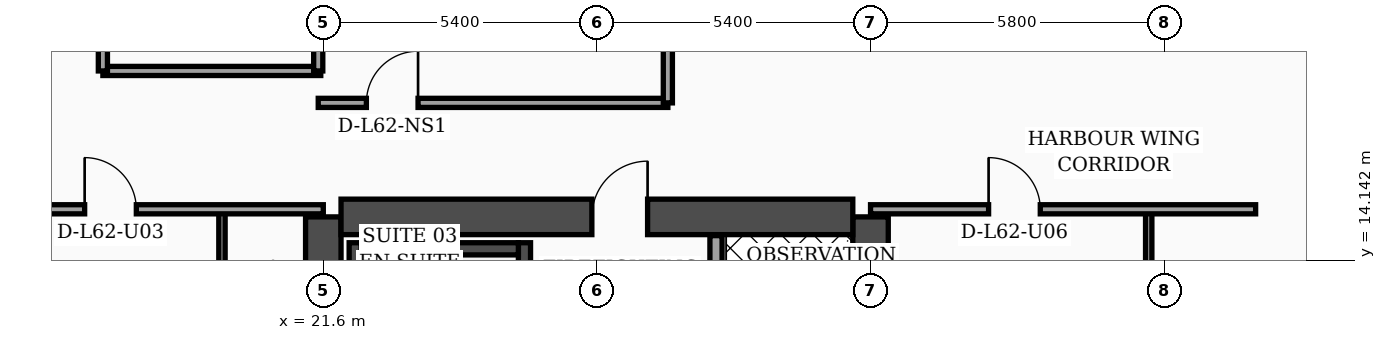
"""IFC4 building model, lengths in metres.
Left out: names, types, materials, properties, quantities, classifications, styles, units other than length and angle.
Written with IfcOpenShell. Run it as: python <this file> out.ifc"""

import sys

from ifc_helpers import new_model, si_unit, direction, frame, frame_2d, origin, place, context, subcontext, project, spatial, rectangle, extrude, element, fill, save


model = new_model("IFC4")
c1 = context("Model", 3, precision=1e-05, world=origin(), true_north=direction((0.0, 1.0)))
c2 = subcontext(c1, "Body", "Model", "MODEL_VIEW")
j1 = project(units=[si_unit("LENGTHUNIT", "METRE"), si_unit("PLANEANGLEUNIT", "RADIAN")], contexts=[c1])
p1 = place(None, origin())
s1 = spatial("IfcSite", under=j1, at=p1, CompositionType="ELEMENT")
p2 = place(p1, origin())
s2 = spatial("IfcBuilding", under=s1, at=p2, CompositionType="ELEMENT")
p3 = place(p2, frame((0.0, 0.0, 251.4)))
s3 = spatial("IfcBuildingStorey", under=s2, at=p3, CompositionType="ELEMENT", Elevation=251.4)
for number, where, z_axis, x_axis in (
    (1, (21.6, 4.6, 0.0), (0.0, 0.0, 1.0), (0.0, 1.0, 0.0)),
    (2, (32.4, 4.6, 0.0), (0.0, 0.0, 1.0), (0.0, 1.0, 0.0)),
):
    element("IfcWall", number, at=place(p3, frame(where, z_axis=z_axis, x_axis=x_axis)), inside=s3, PredefinedType="SHEAR", context=c2, shape_type="SweptSolid", body=[
        extrude(rectangle(XDim=10.4, YDim=0.7, at=frame_2d((5.2, 0.0))), origin(), (0.0, 0.0, 1.0), 3.56),
    ])
p4 = place(p3, frame((21.95, 15.0, 0.0), z_axis=(0.0, 0.0, 1.0), x_axis=(1.0, 0.0, 0.0)))
e3 = element("IfcWall", 3, at=p4, inside=s3, PredefinedType="SHEAR", context=c2, shape_type="SweptSolid", body=[
    extrude(rectangle(XDim=10.1, YDim=0.7, at=frame_2d((5.05, 0.0))), origin(), (0.0, 0.0, 1.0), 3.56),
])
p5 = place(p4, frame((4.95, 0.0, 0.0)))
e4 = element("IfcOpeningElement", 4, at=p5, cuts=e3, PredefinedType="OPENING", context=c2, shape_type="SweptSolid", body=[
    extrude(rectangle(XDim=1.1, YDim=2.2, at=frame_2d((0.55, 1.1))), frame((0.0, 0.36, 0.0), z_axis=(0.0, -1.0, 0.0), x_axis=(1.0, 0.0, 0.0)), (0.0, 0.0, 1.0), 0.72),
])
p6 = place(p3, frame((22.23, 4.95, 0.0), z_axis=(0.0, 0.0, 1.0), x_axis=(0.0, 1.0, 0.0)))
e5 = element("IfcWall", 5, at=p6, inside=s3, PredefinedType="SOLIDWALL", context=c2, shape_type="SweptSolid", body=[
    extrude(rectangle(XDim=9.54, YDim=0.24, at=frame_2d((4.77, 0.0))), origin(), (0.0, 0.0, 1.0), 3.56),
])
p7 = place(p3, frame((25.57, 4.95, 0.0), z_axis=(0.0, 0.0, 1.0), x_axis=(0.0, 1.0, 0.0)))
e6 = element("IfcWall", 6, at=p7, inside=s3, PredefinedType="SOLIDWALL", context=c2, shape_type="SweptSolid", body=[
    extrude(rectangle(XDim=9.54, YDim=0.24, at=frame_2d((4.77, 0.0))), origin(), (0.0, 0.0, 1.0), 3.56),
])
p8 = place(p7, frame((0.35, 0.0, 0.0)))
e7 = element("IfcOpeningElement", 7, at=p8, cuts=e6, PredefinedType="OPENING", context=c2, shape_type="SweptSolid", body=[
    extrude(rectangle(XDim=1.15, YDim=2.2, at=frame_2d((0.575, 1.1))), frame((0.0, 0.13, 0.0), z_axis=(0.0, -1.0, 0.0), x_axis=(1.0, 0.0, 0.0)), (0.0, 0.0, 1.0), 0.26),
])
p9 = place(p3, frame((22.35, 14.37, 0.0), z_axis=(0.0, 0.0, 1.0), x_axis=(1.0, 0.0, 0.0)))
e8 = element("IfcWall", 8, at=p9, inside=s3, PredefinedType="SOLIDWALL", context=c2, shape_type="SweptSolid", body=[
    extrude(rectangle(XDim=3.1, YDim=0.24, at=frame_2d((1.55, 0.0))), origin(), (0.0, 0.0, 1.0), 3.56),
])
p10 = place(p3, frame((46.63, 5.505, 0.0), z_axis=(0.0, 0.0, 1.0), x_axis=(-0.300501856448, 0.953781229775, 0.0)))
e9 = element("IfcWall", 9, at=p10, inside=s3, PredefinedType="SOLIDWALL", context=c2, shape_type="SweptSolid", body=[
    extrude(rectangle(XDim=30.814, YDim=0.32, at=frame_2d((15.407, 0.0))), origin(), (0.0, 0.0, 1.0), 3.56),
])
p11 = place(p10, frame((10.199, 0.0, 0.0)))
e10 = element("IfcOpeningElement", 10, at=p11, cuts=e9, PredefinedType="OPENING", context=c2, shape_type="SweptSolid", body=[
    extrude(rectangle(XDim=1.4, YDim=2.25, at=frame_2d((0.7, 1.125))), frame((0.0, 0.17, 0.0), z_axis=(0.0, -1.0, 0.0), x_axis=(1.0, 0.0, 0.0)), (0.0, 0.0, 1.0), 0.34),
])
p12 = place(p10, frame((4.437, 0.0, 0.7)))
e11 = element("IfcOpeningElement", 11, at=p12, cuts=e9, PredefinedType="OPENING", context=c2, shape_type="SweptSolid", body=[
    extrude(rectangle(XDim=1.6, YDim=1.65, at=frame_2d((0.8, 0.825))), frame((0.0, 0.17, 0.0), z_axis=(0.0, -1.0, 0.0), x_axis=(1.0, 0.0, 0.0)), (0.0, 0.0, 1.0), 0.34),
])
p13 = place(p10, frame((18.696, 0.0, 0.7)))
e12 = element("IfcOpeningElement", 12, at=p13, cuts=e9, PredefinedType="OPENING", context=c2, shape_type="SweptSolid", body=[
    extrude(rectangle(XDim=1.6, YDim=1.65, at=frame_2d((0.8, 0.825))), frame((0.0, 0.17, 0.0), z_axis=(0.0, -1.0, 0.0), x_axis=(1.0, 0.0, 0.0)), (0.0, 0.0, 1.0), 0.34),
])
p14 = place(p10, frame((1.6, 0.0, 0.75)))
e13 = element("IfcOpeningElement", 13, at=p14, cuts=e9, PredefinedType="OPENING", context=c2, shape_type="SweptSolid", body=[
    extrude(rectangle(XDim=1.5, YDim=1.6, at=frame_2d((0.75, 0.8))), frame((0.0, 0.17, 0.0), z_axis=(0.0, -1.0, 0.0), x_axis=(1.0, 0.0, 0.0)), (0.0, 0.0, 1.0), 0.34),
])
p15 = place(p10, frame((7.8, 0.0, 0.75)))
e14 = element("IfcOpeningElement", 14, at=p15, cuts=e9, PredefinedType="OPENING", context=c2, shape_type="SweptSolid", body=[
    extrude(rectangle(XDim=1.5, YDim=1.6, at=frame_2d((0.75, 0.8))), frame((0.0, 0.17, 0.0), z_axis=(0.0, -1.0, 0.0), x_axis=(1.0, 0.0, 0.0)), (0.0, 0.0, 1.0), 0.34),
])
p16 = place(p10, frame((14.0, 0.0, 0.75)))
e15 = element("IfcOpeningElement", 15, at=p16, cuts=e9, PredefinedType="OPENING", context=c2, shape_type="SweptSolid", body=[
    extrude(rectangle(XDim=1.5, YDim=1.6, at=frame_2d((0.75, 0.8))), frame((0.0, 0.17, 0.0), z_axis=(0.0, -1.0, 0.0), x_axis=(1.0, 0.0, 0.0)), (0.0, 0.0, 1.0), 0.34),
])
p17 = place(p10, frame((16.55, 0.0, 0.75)))
e16 = element("IfcOpeningElement", 16, at=p17, cuts=e9, PredefinedType="OPENING", context=c2, shape_type="SweptSolid", body=[
    extrude(rectangle(XDim=1.5, YDim=1.6, at=frame_2d((0.75, 0.8))), frame((0.0, 0.17, 0.0), z_axis=(0.0, -1.0, 0.0), x_axis=(1.0, 0.0, 0.0)), (0.0, 0.0, 1.0), 0.34),
])
p18 = place(p10, frame((20.75, 0.0, 0.75)))
e17 = element("IfcOpeningElement", 17, at=p18, cuts=e9, PredefinedType="OPENING", context=c2, shape_type="SweptSolid", body=[
    extrude(rectangle(XDim=1.5, YDim=1.6, at=frame_2d((0.75, 0.8))), frame((0.0, 0.17, 0.0), z_axis=(0.0, -1.0, 0.0), x_axis=(1.0, 0.0, 0.0)), (0.0, 0.0, 1.0), 0.34),
])
p19 = place(p10, frame((23.3, 0.0, 0.75)))
e18 = element("IfcOpeningElement", 18, at=p19, cuts=e9, PredefinedType="OPENING", context=c2, shape_type="SweptSolid", body=[
    extrude(rectangle(XDim=1.5, YDim=1.6, at=frame_2d((0.75, 0.8))), frame((0.0, 0.17, 0.0), z_axis=(0.0, -1.0, 0.0), x_axis=(1.0, 0.0, 0.0)), (0.0, 0.0, 1.0), 0.34),
])
p20 = place(p10, frame((26.4, 0.0, 0.75)))
e19 = element("IfcOpeningElement", 19, at=p20, cuts=e9, PredefinedType="OPENING", context=c2, shape_type="SweptSolid", body=[
    extrude(rectangle(XDim=1.5, YDim=1.6, at=frame_2d((0.75, 0.8))), frame((0.0, 0.17, 0.0), z_axis=(0.0, -1.0, 0.0), x_axis=(1.0, 0.0, 0.0)), (0.0, 0.0, 1.0), 0.34),
])
p21 = place(p3, frame((29.35, 4.97, 0.0), z_axis=(0.0, 0.0, 1.0), x_axis=(0.0, 1.0, 0.0)))
e20 = element("IfcWall", 20, at=p21, inside=s3, PredefinedType="SOLIDWALL", context=c2, shape_type="SweptSolid", body=[
    extrude(rectangle(XDim=9.66, YDim=0.24, at=frame_2d((4.83, 0.0))), origin(), (0.0, 0.0, 1.0), 3.56),
])
p22 = place(p21, frame((0.55, 0.0, 0.0)))
e21 = element("IfcOpeningElement", 21, at=p22, cuts=e20, PredefinedType="OPENING", context=c2, shape_type="SweptSolid", body=[
    extrude(rectangle(XDim=1.3, YDim=2.35, at=frame_2d((0.65, 1.175))), frame((0.0, 0.13, 0.0), z_axis=(0.0, -1.0, 0.0), x_axis=(1.0, 0.0, 0.0)), (0.0, 0.0, 1.0), 0.26),
])
p23 = place(p3, frame((19.6, 2.44, 0.0), z_axis=(0.0, 0.0, 1.0), x_axis=(0.0, 1.0, 0.0)))
e22 = element("IfcWall", 22, at=p23, inside=s3, PredefinedType="PARTITIONING", context=c2, shape_type="SweptSolid", body=[
    extrude(rectangle(XDim=12.71, YDim=0.125, at=frame_2d((6.355, 0.0))), origin(), (0.0, 0.0, 1.0), 2.59),
])
p24 = place(p23, frame((4.34, 0.0, 0.0)))
e23 = element("IfcOpeningElement", 23, at=p24, cuts=e22, PredefinedType="OPENING", context=c2, shape_type="SweptSolid", body=[
    extrude(rectangle(XDim=0.96, YDim=2.2, at=frame_2d((0.48, 1.1))), frame((0.0, 0.073, 0.0), z_axis=(0.0, -1.0, 0.0), x_axis=(1.0, 0.0, 0.0)), (0.0, 0.0, 1.0), 0.145),
])
p25 = place(p23, frame((10.18, 0.0, 0.0)))
e24 = element("IfcOpeningElement", 24, at=p25, cuts=e22, PredefinedType="OPENING", context=c2, shape_type="SweptSolid", body=[
    extrude(rectangle(XDim=0.9, YDim=2.15, at=frame_2d((0.45, 1.075))), frame((0.0, 0.073, 0.0), z_axis=(0.0, -1.0, 0.0), x_axis=(1.0, 0.0, 0.0)), (0.0, 0.0, 1.0), 0.145),
])
p26 = place(p3, frame((15.15, 15.15, 0.0), z_axis=(0.0, 0.0, 1.0), x_axis=(1.0, 0.0, 0.0)))
e25 = element("IfcWall", 25, at=p26, inside=s3, PredefinedType="PARTITIONING", context=c2, shape_type="SweptSolid", body=[
    extrude(rectangle(XDim=6.45, YDim=0.18, at=frame_2d((3.225, 0.0))), origin(), (0.0, 0.0, 1.0), 2.59),
])
p27 = place(p26, frame((1.74, 0.0, 0.0)))
e26 = element("IfcOpeningElement", 26, at=p27, cuts=e25, PredefinedType="OPENING", context=c2, shape_type="SweptSolid", body=[
    extrude(rectangle(XDim=1.02, YDim=2.2, at=frame_2d((0.51, 1.1))), frame((0.0, 0.1, 0.0), z_axis=(0.0, -1.0, 0.0), x_axis=(1.0, 0.0, 0.0)), (0.0, 0.0, 1.0), 0.2),
])
p28 = place(p3, frame((17.25, 17.88, 0.0), z_axis=(0.0, 0.0, 1.0), x_axis=(1.0, 0.0, 0.0)))
e27 = element("IfcWall", 27, at=p28, inside=s3, PredefinedType="PARTITIONING", context=c2, shape_type="SweptSolid", body=[
    extrude(rectangle(XDim=4.3, YDim=0.18, at=frame_2d((2.15, 0.0))), origin(), (0.0, 0.0, 1.0), 3.56),
])
p29 = place(p3, frame((21.5, 17.88, 0.0), z_axis=(0.0, 0.0, 1.0), x_axis=(0.0, 1.0, 0.0)))
e28 = element("IfcWall", 28, at=p29, inside=s3, PredefinedType="PARTITIONING", context=c2, shape_type="SweptSolid", body=[
    extrude(rectangle(XDim=6.44, YDim=0.18, at=frame_2d((3.22, 0.0))), origin(), (0.0, 0.0, 1.0), 3.09),
])
p30 = place(p3, frame((17.25, 17.88, 0.0), z_axis=(0.0, 0.0, 1.0), x_axis=(0.0, 1.0, 0.0)))
e29 = element("IfcWall", 29, at=p30, inside=s3, PredefinedType="PARTITIONING", context=c2, shape_type="SweptSolid", body=[
    extrude(rectangle(XDim=6.44, YDim=0.18, at=frame_2d((3.22, 0.0))), origin(), (0.0, 0.0, 1.0), 3.09),
])
p31 = place(p30, frame((0.65, 0.0, 0.0)))
e30 = element("IfcOpeningElement", 30, at=p31, cuts=e29, PredefinedType="OPENING", context=c2, shape_type="SweptSolid", body=[
    extrude(rectangle(XDim=0.98, YDim=2.15, at=frame_2d((0.49, 1.075))), frame((0.0, 0.1, 0.0), z_axis=(0.0, -1.0, 0.0), x_axis=(1.0, 0.0, 0.0)), (0.0, 0.0, 1.0), 0.2),
])
p32 = place(p30, frame((3.27, 0.0, 0.0)))
e31 = element("IfcOpeningElement", 31, at=p32, cuts=e29, PredefinedType="OPENING", context=c2, shape_type="SweptSolid", body=[
    extrude(rectangle(XDim=0.96, YDim=2.2, at=frame_2d((0.48, 1.1))), frame((0.0, 0.1, 0.0), z_axis=(0.0, -1.0, 0.0), x_axis=(1.0, 0.0, 0.0)), (0.0, 0.0, 1.0), 0.2),
])
p33 = place(p3, frame((37.89, 2.44, 0.0), z_axis=(0.0, 0.0, 1.0), x_axis=(0.0, 1.0, 0.0)))
e32 = element("IfcWall", 32, at=p33, inside=s3, PredefinedType="PARTITIONING", context=c2, shape_type="SweptSolid", body=[
    extrude(rectangle(XDim=12.71, YDim=0.125, at=frame_2d((6.355, 0.0))), origin(), (0.0, 0.0, 1.0), 2.99),
])
p34 = place(p33, frame((4.35, 0.0, 0.0)))
e33 = element("IfcOpeningElement", 33, at=p34, cuts=e32, PredefinedType="OPENING", context=c2, shape_type="SweptSolid", body=[
    extrude(rectangle(XDim=0.96, YDim=2.2, at=frame_2d((0.48, 1.1))), frame((0.0, 0.073, 0.0), z_axis=(0.0, -1.0, 0.0), x_axis=(1.0, 0.0, 0.0)), (0.0, 0.0, 1.0), 0.145),
])
p35 = place(p33, frame((10.21, 0.0, 0.0)))
e34 = element("IfcOpeningElement", 34, at=p35, cuts=e32, PredefinedType="OPENING", context=c2, shape_type="SweptSolid", body=[
    extrude(rectangle(XDim=0.9, YDim=2.15, at=frame_2d((0.45, 1.075))), frame((0.0, 0.073, 0.0), z_axis=(0.0, -1.0, 0.0), x_axis=(1.0, 0.0, 0.0)), (0.0, 0.0, 1.0), 0.145),
])
p36 = place(p3, frame((32.4, 15.15, 0.0), z_axis=(0.0, 0.0, 1.0), x_axis=(1.0, 0.0, 0.0)))
e35 = element("IfcWall", 35, at=p36, inside=s3, PredefinedType="PARTITIONING", context=c2, shape_type="SweptSolid", body=[
    extrude(rectangle(XDim=7.6, YDim=0.18, at=frame_2d((3.8, 0.0))), origin(), (0.0, 0.0, 1.0), 2.99),
])
p37 = place(p36, frame((2.33, 0.0, 0.0)))
e36 = element("IfcOpeningElement", 36, at=p37, cuts=e35, PredefinedType="OPENING", context=c2, shape_type="SweptSolid", body=[
    extrude(rectangle(XDim=1.02, YDim=2.2, at=frame_2d((0.51, 1.1))), frame((0.0, 0.1, 0.0), z_axis=(0.0, -1.0, 0.0), x_axis=(1.0, 0.0, 0.0)), (0.0, 0.0, 1.0), 0.2),
])
p38 = place(p3, frame((21.5, 17.25, 0.0), z_axis=(0.0, 0.0, 1.0), x_axis=(1.0, 0.0, 0.0)))
e37 = element("IfcWall", 37, at=p38, inside=s3, PredefinedType="PARTITIONING", context=c2, shape_type="SweptSolid", body=[
    extrude(rectangle(XDim=6.9, YDim=0.18, at=frame_2d((3.45, 0.0))), origin(), (0.0, 0.0, 1.0), 2.99),
])
p39 = place(p38, frame((0.95, 0.0, 0.0)))
e38 = element("IfcOpeningElement", 38, at=p39, cuts=e37, PredefinedType="OPENING", context=c2, shape_type="SweptSolid", body=[
    extrude(rectangle(XDim=1.02, YDim=2.2, at=frame_2d((0.51, 1.1))), frame((0.0, 0.1, 0.0), z_axis=(0.0, -1.0, 0.0), x_axis=(1.0, 0.0, 0.0)), (0.0, 0.0, 1.0), 0.2),
])
p40 = place(p3, frame((28.4, 17.25, 0.0), z_axis=(0.0, 0.0, 1.0), x_axis=(0.0, 1.0, 0.0)))
e39 = element("IfcWall", 39, at=p40, inside=s3, PredefinedType="PARTITIONING", context=c2, shape_type="SweptSolid", body=[
    extrude(rectangle(XDim=15.07, YDim=0.18, at=frame_2d((7.535, 0.0))), origin(), (0.0, 0.0, 1.0), 2.99),
])
p41 = place(p27, origin())
e40 = element("IfcDoor", 40, at=p41, inside=s3, OperationType="SINGLE_SWING_LEFT", PredefinedType="DOOR", context=c2, shape_type="SweptSolid", body=[
    extrude(rectangle(XDim=1.02, YDim=2.2, at=frame_2d((0.51, 1.1))), frame((0.0, 0.025, 0.0), z_axis=(0.0, -1.0, 0.0), x_axis=(1.0, 0.0, 0.0)), (0.0, 0.0, 1.0), 0.05),
])
fill(e26, e40)
p42 = place(p37, origin())
e41 = element("IfcDoor", 41, at=p42, inside=s3, OperationType="SINGLE_SWING_LEFT", PredefinedType="DOOR", context=c2, shape_type="SweptSolid", body=[
    extrude(rectangle(XDim=1.02, YDim=2.2, at=frame_2d((0.51, 1.1))), frame((0.0, 0.025, 0.0), z_axis=(0.0, -1.0, 0.0), x_axis=(1.0, 0.0, 0.0)), (0.0, 0.0, 1.0), 0.05),
])
fill(e36, e41)
p43 = place(p39, origin())
e42 = element("IfcDoor", 42, at=p43, inside=s3, OperationType="SINGLE_SWING_RIGHT", PredefinedType="DOOR", context=c2, shape_type="SweptSolid", body=[
    extrude(rectangle(XDim=1.02, YDim=2.2, at=frame_2d((0.51, 1.1))), frame((0.0, 0.025, 0.0), z_axis=(0.0, -1.0, 0.0), x_axis=(1.0, 0.0, 0.0)), (0.0, 0.0, 1.0), 0.05),
])
fill(e38, e42)
p44 = place(p5, origin())
e43 = element("IfcDoor", 43, at=p44, inside=s3, OperationType="SINGLE_SWING_RIGHT", PredefinedType="DOOR", context=c2, shape_type="SweptSolid", body=[
    extrude(rectangle(XDim=1.1, YDim=2.2, at=frame_2d((0.55, 1.1))), frame((0.0, 0.025, 0.0), z_axis=(0.0, -1.0, 0.0), x_axis=(1.0, 0.0, 0.0)), (0.0, 0.0, 1.0), 0.05),
])
fill(e4, e43)
save(model, sys.argv[1])
